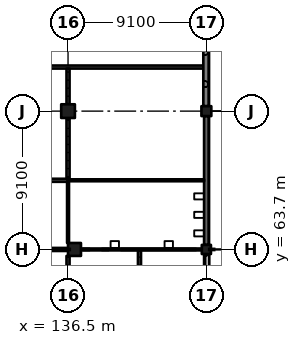
"""IFC4 building model, lengths in metres.
Left out: names, types, materials, properties, quantities, classifications, styles, units other than length and angle.
Written with IfcOpenShell. Run it as: python <this file> out.ifc"""

import sys

from ifc_helpers import new_model, si_unit, direction, frame, frame_2d, origin, origin_2d, place, context, subcontext, project, spatial, rectangle, extrude, element, fill, save


model = new_model("IFC4")
c1 = context("Model", 3, precision=1e-05, world=origin(), true_north=direction((0.0, 1.0)))
c2 = subcontext(c1, "Body", "Model", "MODEL_VIEW")
j1 = project(units=[si_unit("LENGTHUNIT", "METRE"), si_unit("PLANEANGLEUNIT", "RADIAN")], contexts=[c1])
p1 = place(None, origin())
s1 = spatial("IfcSite", under=j1, at=p1, CompositionType="ELEMENT")
p2 = place(p1, origin())
s2 = spatial("IfcBuilding", under=s1, at=p2, CompositionType="ELEMENT")
p3 = place(p2, origin())
s3 = spatial("IfcBuildingStorey", under=s2, at=p3, CompositionType="ELEMENT", Elevation=0.0)
p4 = place(p3, frame((136.925, 63.7, -0.4), z_axis=(0.0, 0.0, 1.0), x_axis=(1.0, 0.0, 0.0)))
e1 = element("IfcColumn", 1, at=p4, inside=s3, PredefinedType="COLUMN", context=c2, shape_type="SweptSolid", body=[
    extrude(rectangle(XDim=0.85, YDim=0.85, at=origin_2d()), origin(), (0.0, 0.0, 1.0), 6.77),
])
p5 = place(p3, frame((136.5, 72.8, -0.4), z_axis=(0.0, 0.0, 1.0), x_axis=(1.0, 0.0, 0.0)))
e2 = element("IfcColumn", 2, at=p5, inside=s3, PredefinedType="COLUMN", context=c2, shape_type="SweptSolid", body=[
    extrude(rectangle(XDim=0.9, YDim=0.9, at=origin_2d()), origin(), (0.0, 0.0, 1.0), 6.77),
])
p6 = place(p3, frame((145.6, 63.7, -0.4), z_axis=(0.0, 0.0, 1.0), x_axis=(1.0, 0.0, 0.0)))
e3 = element("IfcColumn", 3, at=p6, inside=s3, PredefinedType="COLUMN", context=c2, shape_type="SweptSolid", body=[
    extrude(rectangle(XDim=0.6, YDim=0.6, at=origin_2d()), origin(), (0.0, 0.0, 1.0), 6.77),
])
p7 = place(p3, frame((145.6, 72.8, -0.4), z_axis=(0.0, 0.0, 1.0), x_axis=(1.0, 0.0, 0.0)))
e4 = element("IfcColumn", 4, at=p7, inside=s3, PredefinedType="COLUMN", context=c2, shape_type="SweptSolid", body=[
    extrude(rectangle(XDim=0.65, YDim=0.65, at=origin_2d()), origin(), (0.0, 0.0, 1.0), 6.77),
])
p8 = place(p3, frame((145.6, 54.9, 0.0), z_axis=(0.0, 0.0, 1.0), x_axis=(0.0, 1.0, 0.0)))
e5 = element("IfcWall", 5, at=p8, inside=s3, PredefinedType="SOLIDWALL", context=c2, shape_type="SweptSolid", body=[
    extrude(rectangle(XDim=8.5, YDim=0.3, at=frame_2d((4.25, 0.0))), origin(), (0.0, 0.0, 1.0), 3.75),
])
p9 = place(p8, frame((0.435, 0.0, 0.0)))
e6 = element("IfcOpeningElement", 6, at=p9, cuts=e5, PredefinedType="OPENING", context=c2, shape_type="SweptSolid", body=[
    extrude(rectangle(XDim=3.6, YDim=2.7, at=frame_2d((1.8, 1.35))), frame((0.0, 0.16, 0.0), z_axis=(0.0, -1.0, 0.0), x_axis=(1.0, 0.0, 0.0)), (0.0, 0.0, 1.0), 0.32),
])
p10 = place(p8, frame((4.465, 0.0, 0.0)))
e7 = element("IfcOpeningElement", 7, at=p10, cuts=e5, PredefinedType="OPENING", context=c2, shape_type="SweptSolid", body=[
    extrude(rectangle(XDim=3.6, YDim=2.7, at=frame_2d((1.8, 1.35))), frame((0.0, 0.16, 0.0), z_axis=(0.0, -1.0, 0.0), x_axis=(1.0, 0.0, 0.0)), (0.0, 0.0, 1.0), 0.32),
])
p11 = place(p3, frame((145.6, 64.0, 0.0), z_axis=(0.0, 0.0, 1.0), x_axis=(0.0, 1.0, 0.0)))
e8 = element("IfcWall", 8, at=p11, inside=s3, PredefinedType="SOLIDWALL", context=c2, shape_type="SweptSolid", body=[
    extrude(rectangle(XDim=8.475, YDim=0.3, at=frame_2d((4.238, 0.0))), origin(), (0.0, 0.0, 1.0), 5.27),
])
p12 = place(p3, frame((145.575, 73.125, 0.0), z_axis=(0.0, 0.0, 1.0), x_axis=(0.0, 1.0, 0.0)))
e9 = element("IfcWall", 9, at=p12, inside=s3, PredefinedType="SOLIDWALL", context=c2, shape_type="SweptSolid", body=[
    extrude(rectangle(XDim=8.525, YDim=0.35, at=frame_2d((4.262, 0.0))), origin(), (0.0, 0.0, 1.0), 5.27),
])
p13 = place(p3, frame((105.05, 75.7, 0.0), z_axis=(0.0, 0.0, 1.0), x_axis=(1.0, 0.0, 0.0)))
e10 = element("IfcWall", 10, at=p13, inside=s3, PredefinedType="PARTITIONING", context=c2, shape_type="SweptSolid", body=[
    extrude(rectangle(XDim=40.35, YDim=0.2, at=frame_2d((20.175, 0.0))), origin(), (0.0, 0.0, 1.0), 6.02),
])
p14 = place(p13, frame((35.3, 0.0, 0.0)))
e11 = element("IfcOpeningElement", 11, at=p14, cuts=e10, PredefinedType="OPENING", context=c2, shape_type="SweptSolid", body=[
    extrude(rectangle(XDim=1.1, YDim=2.1, at=frame_2d((0.55, 1.05))), frame((0.0, 0.11, 0.0), z_axis=(0.0, -1.0, 0.0), x_axis=(1.0, 0.0, 0.0)), (0.0, 0.0, 1.0), 0.22),
])
p15 = place(p13, frame((17.3, 0.0, 0.0)))
e12 = element("IfcOpeningElement", 12, at=p15, cuts=e10, PredefinedType="OPENING", context=c2, shape_type="SweptSolid", body=[
    extrude(rectangle(XDim=1.1, YDim=2.1, at=frame_2d((0.55, 1.05))), frame((0.0, 0.11, 0.0), z_axis=(0.0, -1.0, 0.0), x_axis=(1.0, 0.0, 0.0)), (0.0, 0.0, 1.0), 0.22),
])
p16 = place(p13, frame((10.45, 0.0, 0.0)))
e13 = element("IfcOpeningElement", 13, at=p16, cuts=e10, PredefinedType="OPENING", context=c2, shape_type="SweptSolid", body=[
    extrude(rectangle(XDim=1.0, YDim=2.1, at=frame_2d((0.5, 1.05))), frame((0.0, 0.11, 0.0), z_axis=(0.0, -1.0, 0.0), x_axis=(1.0, 0.0, 0.0)), (0.0, 0.0, 1.0), 0.22),
])
p17 = place(p13, frame((5.9, 0.0, 0.0)))
e14 = element("IfcOpeningElement", 14, at=p17, cuts=e10, PredefinedType="OPENING", context=c2, shape_type="SweptSolid", body=[
    extrude(rectangle(XDim=1.0, YDim=2.1, at=frame_2d((0.5, 1.05))), frame((0.0, 0.11, 0.0), z_axis=(0.0, -1.0, 0.0), x_axis=(1.0, 0.0, 0.0)), (0.0, 0.0, 1.0), 0.22),
])
p18 = place(p13, frame((28.0, 0.0, 0.0)))
e15 = element("IfcOpeningElement", 15, at=p18, cuts=e10, PredefinedType="OPENING", context=c2, shape_type="SweptSolid", body=[
    extrude(rectangle(XDim=2.4, YDim=2.4, at=frame_2d((1.2, 1.2))), frame((0.0, 0.11, 0.0), z_axis=(0.0, -1.0, 0.0), x_axis=(1.0, 0.0, 0.0)), (0.0, 0.0, 1.0), 0.22),
])
p19 = place(p13, frame((23.4, 0.0, 0.0)))
e16 = element("IfcOpeningElement", 16, at=p19, cuts=e10, PredefinedType="OPENING", context=c2, shape_type="SweptSolid", body=[
    extrude(rectangle(XDim=2.4, YDim=2.4, at=frame_2d((1.2, 1.2))), frame((0.0, 0.11, 0.0), z_axis=(0.0, -1.0, 0.0), x_axis=(1.0, 0.0, 0.0)), (0.0, 0.0, 1.0), 0.22),
])
p20 = place(p13, frame((0.9, 0.0, 0.0)))
e17 = element("IfcOpeningElement", 17, at=p20, cuts=e10, PredefinedType="OPENING", context=c2, shape_type="SweptSolid", body=[
    extrude(rectangle(XDim=2.4, YDim=2.4, at=frame_2d((1.2, 1.2))), frame((0.0, 0.11, 0.0), z_axis=(0.0, -1.0, 0.0), x_axis=(1.0, 0.0, 0.0)), (0.0, 0.0, 1.0), 0.22),
])
p21 = place(p3, frame((136.5, 63.275, 0.0), z_axis=(0.0, 0.0, 1.0), x_axis=(0.0, -1.0, 0.0)))
e18 = element("IfcWall", 18, at=p21, inside=s3, PredefinedType="PARTITIONING", context=c2, shape_type="SweptSolid", body=[
    extrude(rectangle(XDim=8.25, YDim=0.2, at=frame_2d((4.125, 0.0))), origin(), (0.0, 0.0, 1.0), 5.32),
])
p22 = place(p21, frame((1.15, 0.0, 0.0)))
e19 = element("IfcOpeningElement", 19, at=p22, cuts=e18, PredefinedType="OPENING", context=c2, shape_type="SweptSolid", body=[
    extrude(rectangle(XDim=1.8, YDim=2.4, at=frame_2d((0.9, 1.2))), frame((0.0, 0.11, 0.0), z_axis=(0.0, -1.0, 0.0), x_axis=(1.0, 0.0, 0.0)), (0.0, 0.0, 1.0), 0.22),
])
p23 = place(p21, frame((5.25, 0.0, 0.0)))
e20 = element("IfcOpeningElement", 20, at=p23, cuts=e18, PredefinedType="OPENING", context=c2, shape_type="SweptSolid", body=[
    extrude(rectangle(XDim=1.8, YDim=2.4, at=frame_2d((0.9, 1.2))), frame((0.0, 0.11, 0.0), z_axis=(0.0, -1.0, 0.0), x_axis=(1.0, 0.0, 0.0)), (0.0, 0.0, 1.0), 0.22),
])
p24 = place(p3, frame((136.5, 63.7, 0.0), z_axis=(0.0, 0.0, 1.0), x_axis=(-1.0, 0.0, 0.0)))
e21 = element("IfcWall", 21, at=p24, inside=s3, PredefinedType="PARTITIONING", context=c2, shape_type="SweptSolid", body=[
    extrude(rectangle(XDim=8.5, YDim=0.2, at=frame_2d((4.25, 0.0))), origin(), (0.0, 0.0, 1.0), 5.27),
])
p25 = place(p24, frame((0.65, 0.0, 0.0)))
e22 = element("IfcOpeningElement", 22, at=p25, cuts=e21, PredefinedType="OPENING", context=c2, shape_type="SweptSolid", body=[
    extrude(rectangle(XDim=3.0, YDim=2.4, at=frame_2d((1.5, 1.2))), frame((0.0, 0.11, 0.0), z_axis=(0.0, -1.0, 0.0), x_axis=(1.0, 0.0, 0.0)), (0.0, 0.0, 1.0), 0.22),
])
p26 = place(p24, frame((4.85, 0.0, 0.0)))
e23 = element("IfcOpeningElement", 23, at=p26, cuts=e21, PredefinedType="OPENING", context=c2, shape_type="SweptSolid", body=[
    extrude(rectangle(XDim=3.0, YDim=2.4, at=frame_2d((1.5, 1.2))), frame((0.0, 0.11, 0.0), z_axis=(0.0, -1.0, 0.0), x_axis=(1.0, 0.0, 0.0)), (0.0, 0.0, 1.0), 0.22),
])
p27 = place(p3, frame((136.5, 68.15, 0.0), z_axis=(0.0, 0.0, 1.0), x_axis=(0.0, -1.0, 0.0)))
e24 = element("IfcWall", 24, at=p27, inside=s3, PredefinedType="PARTITIONING", context=c2, shape_type="SweptSolid", body=[
    extrude(rectangle(XDim=4.025, YDim=0.125, at=frame_2d((2.012, 0.0))), origin(), (0.0, 0.0, 1.0), 5.32),
])
p28 = place(p27, frame((1.55, 0.0, 0.0)))
e25 = element("IfcOpeningElement", 25, at=p28, cuts=e24, PredefinedType="OPENING", context=c2, shape_type="SweptSolid", body=[
    extrude(rectangle(XDim=0.9, YDim=2.1, at=frame_2d((0.45, 1.05))), frame((0.0, 0.073, 0.0), z_axis=(0.0, -1.0, 0.0), x_axis=(1.0, 0.0, 0.0)), (0.0, 0.0, 1.0), 0.145),
])
p29 = place(p3, frame((136.5, 68.25, 0.0), z_axis=(0.0, 0.0, 1.0), x_axis=(-1.0, 0.0, 0.0)))
e26 = element("IfcWall", 26, at=p29, inside=s3, PredefinedType="PARTITIONING", context=c2, shape_type="SweptSolid", body=[
    extrude(rectangle(XDim=9.2, YDim=0.2, at=frame_2d((4.6, 0.0))), origin(), (0.0, 0.0, 1.0), 6.02),
])
p30 = place(p29, frame((0.75, 0.0, 0.0)))
e27 = element("IfcOpeningElement", 27, at=p30, cuts=e26, PredefinedType="OPENING", context=c2, shape_type="SweptSolid", body=[
    extrude(rectangle(XDim=3.0, YDim=2.4, at=frame_2d((1.5, 1.2))), frame((0.0, 0.11, 0.0), z_axis=(0.0, -1.0, 0.0), x_axis=(1.0, 0.0, 0.0)), (0.0, 0.0, 1.0), 0.22),
])
p31 = place(p29, frame((5.35, 0.0, 0.0)))
e28 = element("IfcOpeningElement", 28, at=p31, cuts=e26, PredefinedType="OPENING", context=c2, shape_type="SweptSolid", body=[
    extrude(rectangle(XDim=3.0, YDim=2.4, at=frame_2d((1.5, 1.2))), frame((0.0, 0.11, 0.0), z_axis=(0.0, -1.0, 0.0), x_axis=(1.0, 0.0, 0.0)), (0.0, 0.0, 1.0), 0.22),
])
p32 = place(p3, frame((136.5, 68.35, 0.0), z_axis=(0.0, 0.0, 1.0), x_axis=(0.0, 1.0, 0.0)))
e29 = element("IfcWall", 29, at=p32, inside=s3, PredefinedType="PARTITIONING", context=c2, shape_type="SweptSolid", body=[
    extrude(rectangle(XDim=4.0, YDim=0.2, at=frame_2d((2.0, 0.0))), origin(), (0.0, 0.0, 1.0), 5.32),
])
p33 = place(p3, frame((136.5, 73.25, 0.0), z_axis=(0.0, 0.0, 1.0), x_axis=(0.0, 1.0, 0.0)))
e30 = element("IfcWall", 30, at=p33, inside=s3, PredefinedType="PARTITIONING", context=c2, shape_type="SweptSolid", body=[
    extrude(rectangle(XDim=2.35, YDim=0.2, at=frame_2d((1.175, 0.0))), origin(), (0.0, 0.0, 1.0), 5.32),
])
p34 = place(p3, frame((137.35, 63.7, 0.0), z_axis=(0.0, 0.0, 1.0), x_axis=(1.0, 0.0, 0.0)))
e31 = element("IfcWall", 31, at=p34, inside=s3, PredefinedType="PARTITIONING", context=c2, shape_type="SweptSolid", body=[
    extrude(rectangle(XDim=7.95, YDim=0.125, at=frame_2d((3.975, 0.0))), origin(), (0.0, 0.0, 1.0), 5.32),
])
p35 = place(p3, frame((141.2, 63.637, 0.0), z_axis=(0.0, 0.0, 1.0), x_axis=(0.0, -1.0, 0.0)))
e32 = element("IfcWall", 32, at=p35, inside=s3, PredefinedType="PARTITIONING", context=c2, shape_type="SweptSolid", body=[
    extrude(rectangle(XDim=18.012, YDim=0.2, at=frame_2d((9.006, 0.0))), origin(), (0.0, 0.0, 1.0), 6.02),
])
p36 = place(p35, frame((0.65, 0.0, 0.0)))
e33 = element("IfcOpeningElement", 33, at=p36, cuts=e32, PredefinedType="OPENING", context=c2, shape_type="SweptSolid", body=[
    extrude(rectangle(XDim=1.8, YDim=2.4, at=frame_2d((0.9, 1.2))), frame((0.0, 0.11, 0.0), z_axis=(0.0, -1.0, 0.0), x_axis=(1.0, 0.0, 0.0)), (0.0, 0.0, 1.0), 0.22),
])
p37 = place(p35, frame((3.65, 0.0, 0.0)))
e34 = element("IfcOpeningElement", 34, at=p37, cuts=e32, PredefinedType="OPENING", context=c2, shape_type="SweptSolid", body=[
    extrude(rectangle(XDim=1.8, YDim=2.4, at=frame_2d((0.9, 1.2))), frame((0.0, 0.11, 0.0), z_axis=(0.0, -1.0, 0.0), x_axis=(1.0, 0.0, 0.0)), (0.0, 0.0, 1.0), 0.22),
])
p38 = place(p35, frame((6.65, 0.0, 0.0)))
e35 = element("IfcOpeningElement", 35, at=p38, cuts=e32, PredefinedType="OPENING", context=c2, shape_type="SweptSolid", body=[
    extrude(rectangle(XDim=1.8, YDim=2.4, at=frame_2d((0.9, 1.2))), frame((0.0, 0.11, 0.0), z_axis=(0.0, -1.0, 0.0), x_axis=(1.0, 0.0, 0.0)), (0.0, 0.0, 1.0), 0.22),
])
p39 = place(p35, frame((9.65, 0.0, 0.0)))
e36 = element("IfcOpeningElement", 36, at=p39, cuts=e32, PredefinedType="OPENING", context=c2, shape_type="SweptSolid", body=[
    extrude(rectangle(XDim=1.8, YDim=2.4, at=frame_2d((0.9, 1.2))), frame((0.0, 0.11, 0.0), z_axis=(0.0, -1.0, 0.0), x_axis=(1.0, 0.0, 0.0)), (0.0, 0.0, 1.0), 0.22),
])
p40 = place(p35, frame((12.65, 0.0, 0.0)))
e37 = element("IfcOpeningElement", 37, at=p40, cuts=e32, PredefinedType="OPENING", context=c2, shape_type="SweptSolid", body=[
    extrude(rectangle(XDim=1.8, YDim=2.4, at=frame_2d((0.9, 1.2))), frame((0.0, 0.11, 0.0), z_axis=(0.0, -1.0, 0.0), x_axis=(1.0, 0.0, 0.0)), (0.0, 0.0, 1.0), 0.22),
])
p41 = place(p35, frame((15.65, 0.0, 0.0)))
e38 = element("IfcOpeningElement", 38, at=p41, cuts=e32, PredefinedType="OPENING", context=c2, shape_type="SweptSolid", body=[
    extrude(rectangle(XDim=1.8, YDim=2.4, at=frame_2d((0.9, 1.2))), frame((0.0, 0.11, 0.0), z_axis=(0.0, -1.0, 0.0), x_axis=(1.0, 0.0, 0.0)), (0.0, 0.0, 1.0), 0.22),
])
p42 = place(p3, frame((145.45, 68.25, 0.0), z_axis=(0.0, 0.0, 1.0), x_axis=(-1.0, 0.0, 0.0)))
e39 = element("IfcWall", 39, at=p42, inside=s3, PredefinedType="PARTITIONING", context=c2, shape_type="SweptSolid", body=[
    extrude(rectangle(XDim=8.95, YDim=0.125, at=frame_2d((4.475, 0.0))), origin(), (0.0, 0.0, 1.0), 6.02),
])
p43 = place(p10, frame((3.6, 0.0, 0.0), z_axis=(0.0, 0.0, 1.0), x_axis=(-1.0, 0.0, 0.0)))
e40 = element("IfcDoor", 40, at=p43, inside=s3, OperationType="DOUBLE_DOOR_SINGLE_SWING", PredefinedType="DOOR", context=c2, shape_type="SweptSolid", body=[
    extrude(rectangle(XDim=3.6, YDim=2.7, at=frame_2d((1.8, 1.35))), frame((0.0, 0.025, 0.0), z_axis=(0.0, -1.0, 0.0), x_axis=(1.0, 0.0, 0.0)), (0.0, 0.0, 1.0), 0.05),
])
fill(e7, e40)
p44 = place(p14, origin())
e41 = element("IfcDoor", 41, at=p44, inside=s3, OperationType="SINGLE_SWING_LEFT", PredefinedType="DOOR", context=c2, shape_type="SweptSolid", body=[
    extrude(rectangle(XDim=1.1, YDim=2.1, at=frame_2d((0.55, 1.05))), frame((0.0, 0.025, 0.0), z_axis=(0.0, -1.0, 0.0), x_axis=(1.0, 0.0, 0.0)), (0.0, 0.0, 1.0), 0.05),
])
fill(e11, e41)
p45 = place(p28, origin())
e42 = element("IfcDoor", 42, at=p45, inside=s3, OperationType="SINGLE_SWING_RIGHT", PredefinedType="DOOR", context=c2, shape_type="SweptSolid", body=[
    extrude(rectangle(XDim=0.9, YDim=2.1, at=frame_2d((0.45, 1.05))), frame((0.0, 0.025, 0.0), z_axis=(0.0, -1.0, 0.0), x_axis=(1.0, 0.0, 0.0)), (0.0, 0.0, 1.0), 0.05),
])
fill(e25, e42)
p46 = place(p30, origin())
e43 = element("IfcDoor", 43, at=p46, inside=s3, OperationType="DOUBLE_DOOR_SINGLE_SWING", PredefinedType="DOOR", context=c2, shape_type="SweptSolid", body=[
    extrude(rectangle(XDim=3.0, YDim=2.4, at=frame_2d((1.5, 1.2))), frame((0.0, 0.025, 0.0), z_axis=(0.0, -1.0, 0.0), x_axis=(1.0, 0.0, 0.0)), (0.0, 0.0, 1.0), 0.05),
])
fill(e27, e43)
p47 = place(p25, origin())
e44 = element("IfcDoor", 44, at=p47, inside=s3, OperationType="DOUBLE_DOOR_SINGLE_SWING", PredefinedType="DOOR", context=c2, shape_type="SweptSolid", body=[
    extrude(rectangle(XDim=3.0, YDim=2.4, at=frame_2d((1.5, 1.2))), frame((0.0, 0.025, 0.0), z_axis=(0.0, -1.0, 0.0), x_axis=(1.0, 0.0, 0.0)), (0.0, 0.0, 1.0), 0.05),
])
fill(e22, e44)
p48 = place(p36, origin())
e45 = element("IfcDoor", 45, at=p48, inside=s3, OperationType="DOUBLE_DOOR_SINGLE_SWING", PredefinedType="DOOR", context=c2, shape_type="SweptSolid", body=[
    extrude(rectangle(XDim=1.8, YDim=2.4, at=frame_2d((0.9, 1.2))), frame((0.0, 0.025, 0.0), z_axis=(0.0, -1.0, 0.0), x_axis=(1.0, 0.0, 0.0)), (0.0, 0.0, 1.0), 0.05),
])
fill(e33, e45)
save(model, sys.argv[1])
